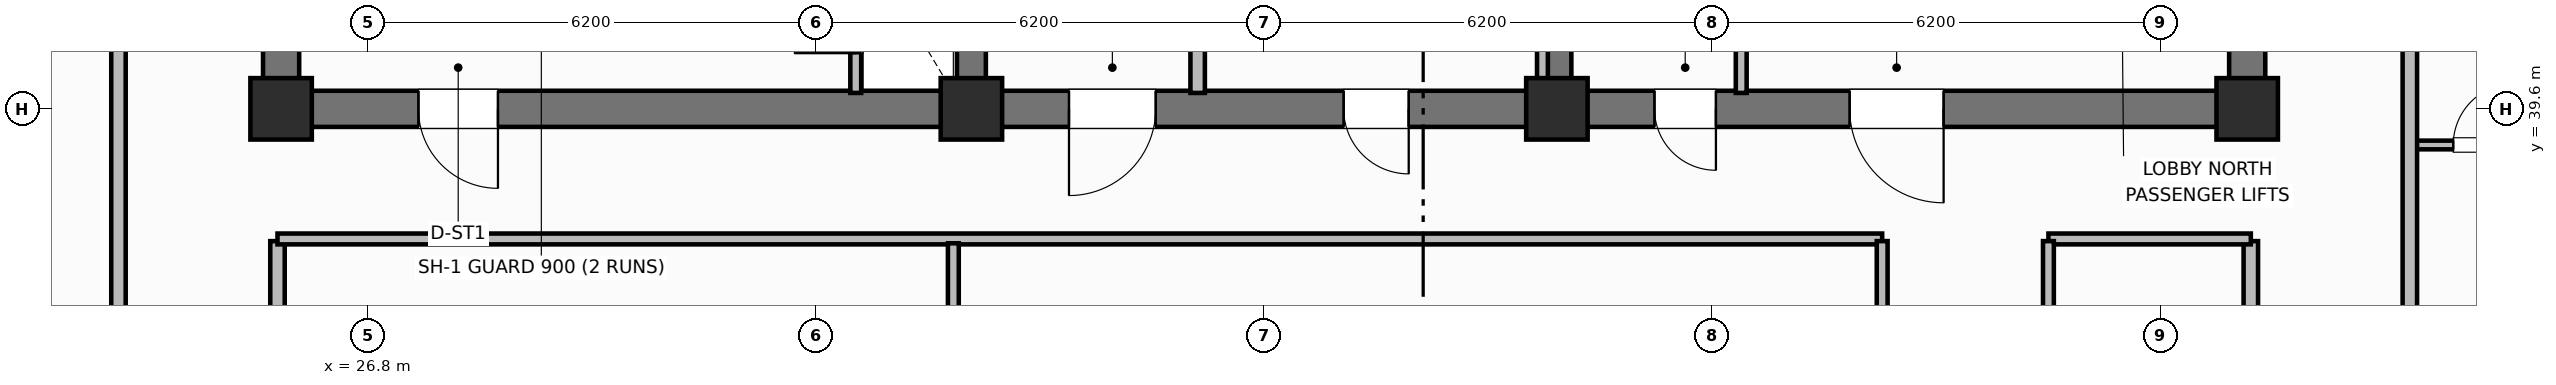
"""IFC4 building model, lengths in metres.
Left out: names, types, materials, properties, quantities, classifications, styles, units other than length and angle.
Written with IfcOpenShell. Run it as: python <this file> out.ifc"""

import sys

from ifc_helpers import new_model, si_unit, direction, frame, frame_2d, origin, origin_2d, place, context, subcontext, project, spatial, rectangle, extrude, element, fill, save


model = new_model("IFC4")
c1 = context("Model", 3, precision=1e-05, world=origin(), true_north=direction((0.0, 1.0)))
c2 = subcontext(c1, "Body", "Model", "MODEL_VIEW")
j1 = project(units=[si_unit("LENGTHUNIT", "METRE"), si_unit("PLANEANGLEUNIT", "RADIAN")], contexts=[c1])
p1 = place(None, origin())
s1 = spatial("IfcSite", under=j1, at=p1, CompositionType="ELEMENT")
p2 = place(p1, origin())
s2 = spatial("IfcBuilding", under=s1, at=p2, CompositionType="ELEMENT")
p3 = place(p2, frame((0.0, 0.0, 211.0)))
s3 = spatial("IfcBuildingStorey", under=s2, at=p3, CompositionType="ELEMENT", Elevation=211.0)
for number, where, z_axis, x_axis in (
    (1, (25.6, 39.85, 0.0), (0.0, 0.0, 1.0), (0.0, 1.0, 0.0)),
    (2, (52.8, 39.85, 0.0), (0.0, 0.0, 1.0), (0.0, 1.0, 0.0)),
):
    element("IfcWall", number, at=place(p3, frame(where, z_axis=z_axis, x_axis=x_axis)), inside=s3, PredefinedType="SHEAR", context=c2, shape_type="SweptSolid", body=[
        extrude(rectangle(XDim=5.7, YDim=0.5, at=frame_2d((2.85, 0.0))), origin(), (0.0, 0.0, 1.0), 3.7),
    ])
p4 = place(p3, frame((52.8, 39.6, 0.0), z_axis=(0.0, 0.0, 1.0), x_axis=(-1.0, 0.0, 0.0)))
e3 = element("IfcWall", 3, at=p4, inside=s3, PredefinedType="SHEAR", context=c2, shape_type="SweptSolid", body=[
    extrude(rectangle(XDim=27.2, YDim=0.5, at=frame_2d((13.6, 0.0))), origin(), (0.0, 0.0, 1.0), 3.7),
])
p5 = place(p4, frame((24.2, 0.0, 0.0)))
e4 = element("IfcOpeningElement", 4, at=p5, cuts=e3, PredefinedType="OPENING", context=c2, shape_type="SweptSolid", body=[
    extrude(rectangle(XDim=1.1, YDim=2.15, at=frame_2d((0.55, 1.075))), frame((0.0, 0.26, 0.0), z_axis=(0.0, -1.0, 0.0), x_axis=(1.0, 0.0, 0.0)), (0.0, 0.0, 1.0), 0.52),
])
p6 = place(p4, frame((15.1, 0.0, 0.0)))
e5 = element("IfcOpeningElement", 5, at=p6, cuts=e3, PredefinedType="OPENING", context=c2, shape_type="SweptSolid", body=[
    extrude(rectangle(XDim=1.2, YDim=2.15, at=frame_2d((0.6, 1.075))), frame((0.0, 0.26, 0.0), z_axis=(0.0, -1.0, 0.0), x_axis=(1.0, 0.0, 0.0)), (0.0, 0.0, 1.0), 0.52),
])
p7 = place(p4, frame((11.6, 0.0, 0.0)))
e6 = element("IfcOpeningElement", 6, at=p7, cuts=e3, PredefinedType="OPENING", context=c2, shape_type="SweptSolid", body=[
    extrude(rectangle(XDim=0.9, YDim=2.1, at=frame_2d((0.45, 1.05))), frame((0.0, 0.26, 0.0), z_axis=(0.0, -1.0, 0.0), x_axis=(1.0, 0.0, 0.0)), (0.0, 0.0, 1.0), 0.52),
])
p8 = place(p4, frame((7.35, 0.0, 0.0)))
e7 = element("IfcOpeningElement", 7, at=p8, cuts=e3, PredefinedType="OPENING", context=c2, shape_type="SweptSolid", body=[
    extrude(rectangle(XDim=0.85, YDim=2.1, at=frame_2d((0.425, 1.05))), frame((0.0, 0.26, 0.0), z_axis=(0.0, -1.0, 0.0), x_axis=(1.0, 0.0, 0.0)), (0.0, 0.0, 1.0), 0.52),
])
p9 = place(p4, frame((4.2, 0.0, 0.0)))
e8 = element("IfcOpeningElement", 8, at=p9, cuts=e3, PredefinedType="OPENING", context=c2, shape_type="SweptSolid", body=[
    extrude(rectangle(XDim=1.3, YDim=2.2, at=frame_2d((0.65, 1.1))), frame((0.0, 0.26, 0.0), z_axis=(0.0, -1.0, 0.0), x_axis=(1.0, 0.0, 0.0)), (0.0, 0.0, 1.0), 0.52),
])
for number, where, z_axis, x_axis in (
    (9, (35.15, 39.85, 0.0), (0.0, 0.0, 1.0), (0.0, 1.0, 0.0)),
    (10, (43.25, 39.85, 0.0), (0.0, 0.0, 1.0), (0.0, 1.0, 0.0)),
):
    element("IfcWall", number, at=place(p3, frame(where, z_axis=z_axis, x_axis=x_axis)), inside=s3, PredefinedType="SHEAR", context=c2, shape_type="SweptSolid", body=[
        extrude(rectangle(XDim=5.7, YDim=0.4, at=frame_2d((2.85, 0.0))), origin(), (0.0, 0.0, 1.0), 3.7),
    ])
for number, where, z_axis, x_axis in (
    (11, (25.6, 39.6, 0.0), (0.0, 0.0, 1.0), (1.0, 0.0, 0.0)),
    (12, (35.15, 39.6, 0.0), (0.0, 0.0, 1.0), (1.0, 0.0, 0.0)),
    (13, (43.25, 39.6, 0.0), (0.0, 0.0, 1.0), (1.0, 0.0, 0.0)),
    (14, (52.8, 39.6, 0.0), (0.0, 0.0, 1.0), (1.0, 0.0, 0.0)),
):
    element("IfcColumn", number, at=place(p3, frame(where, z_axis=z_axis, x_axis=x_axis)), inside=s3, PredefinedType="COLUMN", context=c2, shape_type="SweptSolid", body=[
        extrude(rectangle(XDim=0.85, YDim=0.85, at=origin_2d()), origin(), (0.0, 0.0, 1.0), 3.7),
    ])
p10 = place(p3, frame((33.55, 39.82, 0.0), z_axis=(0.0, 0.0, 1.0), x_axis=(0.0, 1.0, 0.0)))
e15 = element("IfcWall", 15, at=p10, inside=s3, PredefinedType="PARTITIONING", context=c2, shape_type="SweptSolid", body=[
    extrude(rectangle(XDim=2.13, YDim=0.15, at=frame_2d((1.065, 0.0))), origin(), (0.0, 0.0, 1.0), 2.55),
])
p11 = place(p10, frame((0.55, 0.0, 0.0)))
e16 = element("IfcOpeningElement", 16, at=p11, cuts=e15, PredefinedType="OPENING", context=c2, shape_type="SweptSolid", body=[
    extrude(rectangle(XDim=0.85, YDim=2.05, at=frame_2d((0.425, 1.025))), frame((0.0, 0.085, 0.0), z_axis=(0.0, -1.0, 0.0), x_axis=(1.0, 0.0, 0.0)), (0.0, 0.0, 1.0), 0.17),
])
p12 = place(p3, frame((38.28, 39.82, 0.0), z_axis=(0.0, 0.0, 1.0), x_axis=(0.0, 1.0, 0.0)))
e17 = element("IfcWall", 17, at=p12, inside=s3, PredefinedType="PARTITIONING", context=c2, shape_type="SweptSolid", body=[
    extrude(rectangle(XDim=5.63, YDim=0.2, at=frame_2d((2.815, 0.0))), origin(), (0.0, 0.0, 1.0), 2.55),
])
for number, where, z_axis, x_axis in (
    (18, (43.05, 39.82, 0.0), (0.0, 0.0, 1.0), (0.0, 1.0, 0.0)),
    (19, (45.8, 39.82, 0.0), (0.0, 0.0, 1.0), (0.0, 1.0, 0.0)),
):
    element("IfcWall", number, at=place(p3, frame(where, z_axis=z_axis, x_axis=x_axis)), inside=s3, PredefinedType="PARTITIONING", context=c2, shape_type="SweptSolid", body=[
        extrude(rectangle(XDim=5.63, YDim=0.15, at=frame_2d((2.815, 0.0))), origin(), (0.0, 0.0, 1.0), 2.55),
    ])
for number, where, z_axis, x_axis in (
    (20, (25.55, 18.63, 0.0), (0.0, 0.0, 1.0), (0.0, 1.0, 0.0)),
    (21, (52.85, 18.63, 0.0), (0.0, 0.0, 1.0), (0.0, 1.0, 0.0)),
):
    element("IfcWall", number, at=place(p3, frame(where, z_axis=z_axis, x_axis=x_axis)), inside=s3, PredefinedType="PARTITIONING", context=c2, shape_type="SweptSolid", body=[
        extrude(rectangle(XDim=19.14, YDim=0.2, at=frame_2d((9.57, 0.0))), origin(), (0.0, 0.0, 1.0), 2.55),
    ])
p13 = place(p3, frame((25.55, 37.8, 0.0), z_axis=(0.0, 0.0, 1.0), x_axis=(1.0, 0.0, 0.0)))
e22 = element("IfcWall", 22, at=p13, inside=s3, PredefinedType="PARTITIONING", context=c2, shape_type="SweptSolid", body=[
    extrude(rectangle(XDim=22.2, YDim=0.15, at=frame_2d((11.1, 0.0))), origin(), (0.0, 0.0, 1.0), 2.55),
])
p14 = place(p3, frame((50.05, 37.8, 0.0), z_axis=(0.0, 0.0, 1.0), x_axis=(1.0, 0.0, 0.0)))
e23 = element("IfcWall", 23, at=p14, inside=s3, PredefinedType="PARTITIONING", context=c2, shape_type="SweptSolid", body=[
    extrude(rectangle(XDim=2.8, YDim=0.15, at=frame_2d((1.4, 0.0))), origin(), (0.0, 0.0, 1.0), 2.55),
])
p15 = place(p3, frame((34.9, 18.66, 0.0), z_axis=(0.0, 0.0, 1.0), x_axis=(0.0, 1.0, 0.0)))
e24 = element("IfcWall", 24, at=p15, inside=s3, PredefinedType="PARTITIONING", context=c2, shape_type="SweptSolid", body=[
    extrude(rectangle(XDim=19.08, YDim=0.15, at=frame_2d((9.54, 0.0))), origin(), (0.0, 0.0, 1.0), 2.55),
])
p16 = place(p15, frame((5.0, 0.0, 0.0)))
e25 = element("IfcOpeningElement", 25, at=p16, cuts=e24, PredefinedType="OPENING", context=c2, shape_type="SweptSolid", body=[
    extrude(rectangle(XDim=1.0, YDim=2.15, at=frame_2d((0.5, 1.075))), frame((0.0, 0.085, 0.0), z_axis=(0.0, -1.0, 0.0), x_axis=(1.0, 0.0, 0.0)), (0.0, 0.0, 1.0), 0.17),
])
p17 = place(p3, frame((47.75, 18.63, 0.0), z_axis=(0.0, 0.0, 1.0), x_axis=(0.0, 1.0, 0.0)))
e26 = element("IfcWall", 26, at=p17, inside=s3, PredefinedType="PARTITIONING", context=c2, shape_type="SweptSolid", body=[
    extrude(rectangle(XDim=19.14, YDim=0.15, at=frame_2d((9.57, 0.0))), origin(), (0.0, 0.0, 1.0), 2.55),
])
p18 = place(p17, frame((2.4, 0.0, 0.0)))
e27 = element("IfcOpeningElement", 27, at=p18, cuts=e26, PredefinedType="OPENING", context=c2, shape_type="SweptSolid", body=[
    extrude(rectangle(XDim=0.9, YDim=2.1, at=frame_2d((0.45, 1.05))), frame((0.0, 0.085, 0.0), z_axis=(0.0, -1.0, 0.0), x_axis=(1.0, 0.0, 0.0)), (0.0, 0.0, 1.0), 0.17),
])
p19 = place(p17, frame((9.847, 0.0, 0.0)))
e28 = element("IfcOpeningElement", 28, at=p19, cuts=e26, PredefinedType="OPENING", context=c2, shape_type="SweptSolid", body=[
    extrude(rectangle(XDim=0.9, YDim=2.1, at=frame_2d((0.45, 1.05))), frame((0.0, 0.085, 0.0), z_axis=(0.0, -1.0, 0.0), x_axis=(1.0, 0.0, 0.0)), (0.0, 0.0, 1.0), 0.17),
])
p20 = place(p3, frame((50.05, 18.63, 0.0), z_axis=(0.0, 0.0, 1.0), x_axis=(0.0, 1.0, 0.0)))
e29 = element("IfcWall", 29, at=p20, inside=s3, PredefinedType="PARTITIONING", context=c2, shape_type="SweptSolid", body=[
    extrude(rectangle(XDim=19.14, YDim=0.15, at=frame_2d((9.57, 0.0))), origin(), (0.0, 0.0, 1.0), 2.55),
])
p21 = place(p20, frame((2.2, 0.0, 0.0)))
e30 = element("IfcOpeningElement", 30, at=p21, cuts=e29, PredefinedType="OPENING", context=c2, shape_type="SweptSolid", body=[
    extrude(rectangle(XDim=1.0, YDim=2.15, at=frame_2d((0.5, 1.075))), frame((0.0, 0.085, 0.0), z_axis=(0.0, -1.0, 0.0), x_axis=(1.0, 0.0, 0.0)), (0.0, 0.0, 1.0), 0.17),
])
p22 = place(p20, frame((9.847, 0.0, 0.0)))
e31 = element("IfcOpeningElement", 31, at=p22, cuts=e29, PredefinedType="OPENING", context=c2, shape_type="SweptSolid", body=[
    extrude(rectangle(XDim=1.0, YDim=2.15, at=frame_2d((0.5, 1.075))), frame((0.0, 0.085, 0.0), z_axis=(0.0, -1.0, 0.0), x_axis=(1.0, 0.0, 0.0)), (0.0, 0.0, 1.0), 0.17),
])
p23 = place(p3, frame((23.35, 10.6, 0.0), z_axis=(0.0, 0.0, 1.0), x_axis=(0.0, 1.0, 0.0)))
e32 = element("IfcWall", 32, at=p23, inside=s3, PredefinedType="PARTITIONING", context=c2, shape_type="SweptSolid", body=[
    extrude(rectangle(XDim=35.2, YDim=0.2, at=frame_2d((17.6, 0.0))), origin(), (0.0, 0.0, 1.0), 2.55),
])
p24 = place(p23, frame((2.65, 0.0, 0.0)))
e33 = element("IfcOpeningElement", 33, at=p24, cuts=e32, PredefinedType="OPENING", context=c2, shape_type="SweptSolid", body=[
    extrude(rectangle(XDim=1.0, YDim=2.15, at=frame_2d((0.5, 1.075))), frame((0.0, 0.11, 0.0), z_axis=(0.0, -1.0, 0.0), x_axis=(1.0, 0.0, 0.0)), (0.0, 0.0, 1.0), 0.22),
])
p25 = place(p23, frame((19.79, 0.0, 0.0)))
e34 = element("IfcOpeningElement", 34, at=p25, cuts=e32, PredefinedType="OPENING", context=c2, shape_type="SweptSolid", body=[
    extrude(rectangle(XDim=1.0, YDim=2.15, at=frame_2d((0.5, 1.075))), frame((0.0, 0.11, 0.0), z_axis=(0.0, -1.0, 0.0), x_axis=(1.0, 0.0, 0.0)), (0.0, 0.0, 1.0), 0.22),
])
p26 = place(p3, frame((55.05, 39.1, 0.0), z_axis=(0.0, 0.0, 1.0), x_axis=(1.0, 0.0, 0.0)))
e35 = element("IfcWall", 35, at=p26, inside=s3, PredefinedType="PARTITIONING", context=c2, shape_type="SweptSolid", body=[
    extrude(rectangle(XDim=2.25, YDim=0.12, at=frame_2d((1.125, 0.0))), origin(), (0.0, 0.0, 1.0), 2.55),
])
p27 = place(p26, frame((0.6, 0.0, 0.0)))
e36 = element("IfcOpeningElement", 36, at=p27, cuts=e35, PredefinedType="OPENING", context=c2, shape_type="SweptSolid", body=[
    extrude(rectangle(XDim=0.85, YDim=2.1, at=frame_2d((0.425, 1.05))), frame((0.0, 0.07, 0.0), z_axis=(0.0, -1.0, 0.0), x_axis=(1.0, 0.0, 0.0)), (0.0, 0.0, 1.0), 0.14),
])
p28 = place(p3, frame((55.05, 10.6, 0.0), z_axis=(0.0, 0.0, 1.0), x_axis=(0.0, 1.0, 0.0)))
e37 = element("IfcWall", 37, at=p28, inside=s3, PredefinedType="PARTITIONING", context=c2, shape_type="SweptSolid", body=[
    extrude(rectangle(XDim=35.2, YDim=0.2, at=frame_2d((17.6, 0.0))), origin(), (0.0, 0.0, 1.0), 2.55),
])
p29 = place(p28, frame((2.65, 0.0, 0.0)))
e38 = element("IfcOpeningElement", 38, at=p29, cuts=e37, PredefinedType="OPENING", context=c2, shape_type="SweptSolid", body=[
    extrude(rectangle(XDim=1.0, YDim=2.15, at=frame_2d((0.5, 1.075))), frame((0.0, 0.11, 0.0), z_axis=(0.0, -1.0, 0.0), x_axis=(1.0, 0.0, 0.0)), (0.0, 0.0, 1.0), 0.22),
])
p30 = place(p28, frame((12.166, 0.0, 0.0)))
e39 = element("IfcOpeningElement", 39, at=p30, cuts=e37, PredefinedType="OPENING", context=c2, shape_type="SweptSolid", body=[
    extrude(rectangle(XDim=1.0, YDim=2.15, at=frame_2d((0.5, 1.075))), frame((0.0, 0.11, 0.0), z_axis=(0.0, -1.0, 0.0), x_axis=(1.0, 0.0, 0.0)), (0.0, 0.0, 1.0), 0.22),
])
p31 = place(p28, frame((23.65, 0.0, 0.0)))
e40 = element("IfcOpeningElement", 40, at=p31, cuts=e37, PredefinedType="OPENING", context=c2, shape_type="SweptSolid", body=[
    extrude(rectangle(XDim=1.0, YDim=2.15, at=frame_2d((0.5, 1.075))), frame((0.0, 0.11, 0.0), z_axis=(0.0, -1.0, 0.0), x_axis=(1.0, 0.0, 0.0)), (0.0, 0.0, 1.0), 0.22),
])
p32 = place(p11, origin())
e41 = element("IfcDoor", 41, at=p32, inside=s3, OperationType="SINGLE_SWING_LEFT", PredefinedType="TRAPDOOR", context=c2, shape_type="SweptSolid", body=[
    extrude(rectangle(XDim=0.85, YDim=2.05, at=frame_2d((0.425, 1.025))), frame((0.0, 0.025, 0.0), z_axis=(0.0, -1.0, 0.0), x_axis=(1.0, 0.0, 0.0)), (0.0, 0.0, 1.0), 0.05),
])
fill(e16, e41)
p33 = place(p27, origin())
e42 = element("IfcDoor", 42, at=p33, inside=s3, OperationType="SINGLE_SWING_RIGHT", PredefinedType="DOOR", context=c2, shape_type="SweptSolid", body=[
    extrude(rectangle(XDim=0.85, YDim=2.1, at=frame_2d((0.425, 1.05))), frame((0.0, 0.025, 0.0), z_axis=(0.0, -1.0, 0.0), x_axis=(1.0, 0.0, 0.0)), (0.0, 0.0, 1.0), 0.05),
])
fill(e36, e42)
p34 = place(p5, origin())
e43 = element("IfcDoor", 43, at=p34, inside=s3, OperationType="SINGLE_SWING_LEFT", PredefinedType="DOOR", context=c2, shape_type="SweptSolid", body=[
    extrude(rectangle(XDim=1.1, YDim=2.15, at=frame_2d((0.55, 1.075))), frame((0.0, 0.025, 0.0), z_axis=(0.0, -1.0, 0.0), x_axis=(1.0, 0.0, 0.0)), (0.0, 0.0, 1.0), 0.05),
])
fill(e4, e43)
p35 = place(p6, origin())
e44 = element("IfcDoor", 44, at=p35, inside=s3, OperationType="SINGLE_SWING_RIGHT", PredefinedType="DOOR", context=c2, shape_type="SweptSolid", body=[
    extrude(rectangle(XDim=1.2, YDim=2.15, at=frame_2d((0.6, 1.075))), frame((0.0, 0.025, 0.0), z_axis=(0.0, -1.0, 0.0), x_axis=(1.0, 0.0, 0.0)), (0.0, 0.0, 1.0), 0.05),
])
fill(e5, e44)
p36 = place(p7, origin())
e45 = element("IfcDoor", 45, at=p36, inside=s3, OperationType="SINGLE_SWING_LEFT", PredefinedType="DOOR", context=c2, shape_type="SweptSolid", body=[
    extrude(rectangle(XDim=0.9, YDim=2.1, at=frame_2d((0.45, 1.05))), frame((0.0, 0.025, 0.0), z_axis=(0.0, -1.0, 0.0), x_axis=(1.0, 0.0, 0.0)), (0.0, 0.0, 1.0), 0.05),
])
fill(e6, e45)
p37 = place(p8, origin())
e46 = element("IfcDoor", 46, at=p37, inside=s3, OperationType="SINGLE_SWING_LEFT", PredefinedType="DOOR", context=c2, shape_type="SweptSolid", body=[
    extrude(rectangle(XDim=0.85, YDim=2.1, at=frame_2d((0.425, 1.05))), frame((0.0, 0.025, 0.0), z_axis=(0.0, -1.0, 0.0), x_axis=(1.0, 0.0, 0.0)), (0.0, 0.0, 1.0), 0.05),
])
fill(e7, e46)
p38 = place(p9, origin())
e47 = element("IfcDoor", 47, at=p38, inside=s3, OperationType="SINGLE_SWING_LEFT", PredefinedType="DOOR", context=c2, shape_type="SweptSolid", body=[
    extrude(rectangle(XDim=1.3, YDim=2.2, at=frame_2d((0.65, 1.1))), frame((0.0, 0.025, 0.0), z_axis=(0.0, -1.0, 0.0), x_axis=(1.0, 0.0, 0.0)), (0.0, 0.0, 1.0), 0.05),
])
fill(e8, e47)
save(model, sys.argv[1])
